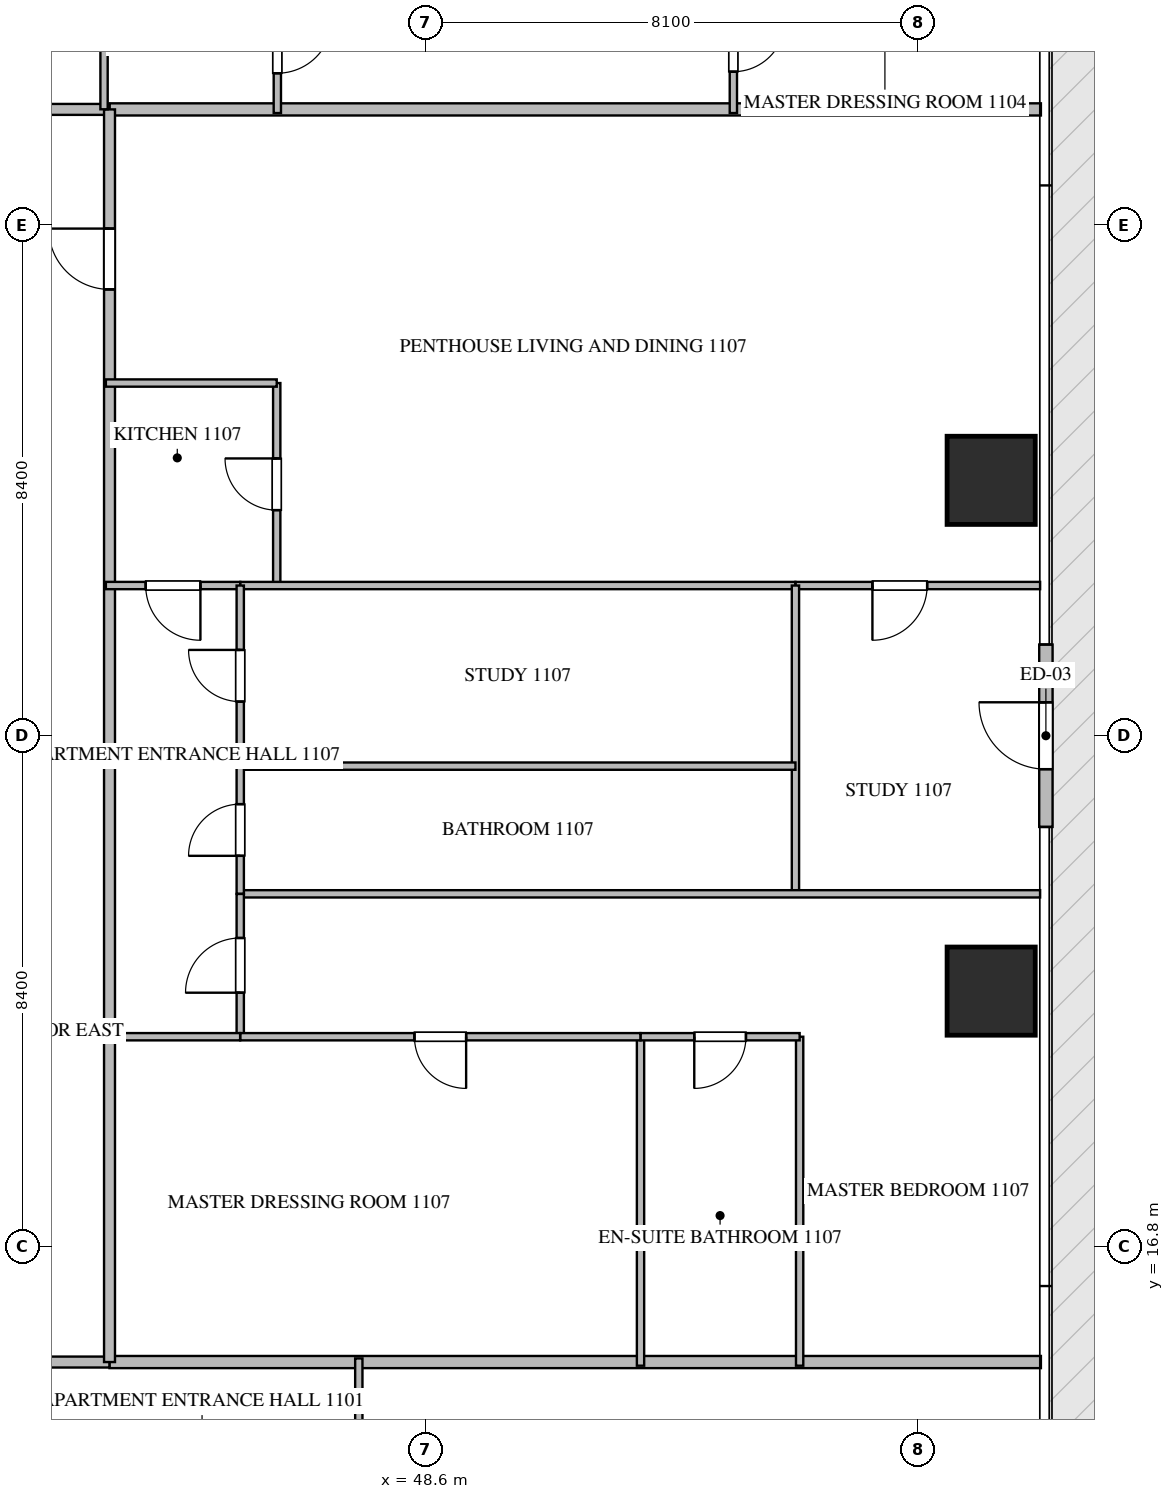
"""IFC4 building model, lengths in metres.
Left out: names, types, materials, properties, quantities, classifications, styles, units other than length and angle.
Written with IfcOpenShell. Run it as: python <this file> out.ifc"""

import sys

from ifc_helpers import new_model, si_unit, direction, frame, frame_2d, origin, origin_2d, place, context, subcontext, project, spatial, rectangle, extrude, source, transform, mapped, element, fill, save


model = new_model("IFC4")
c1 = context("Model", 3, precision=1e-05, world=origin(), true_north=direction((0.0, 1.0)))
c2 = subcontext(c1, "Body", "Model", "MODEL_VIEW")
j1 = project(units=[si_unit("LENGTHUNIT", "METRE"), si_unit("PLANEANGLEUNIT", "RADIAN")], contexts=[c1])
p1 = place(None, origin())
s1 = spatial("IfcSite", under=j1, at=p1, CompositionType="ELEMENT")
p2 = place(p1, origin())
s2 = spatial("IfcBuilding", under=s1, at=p2, CompositionType="ELEMENT")
p3 = place(p2, frame((0.0, 0.0, 49.2)))
s3 = spatial("IfcBuildingStorey", under=s2, at=p3, CompositionType="ELEMENT", Elevation=49.2)
m1 = source(origin(), c2, "Body", "SweptSolid", [
    extrude(rectangle(XDim=1.45, YDim=1.45, at=origin_2d()), origin(), (0.0, 0.0, 1.0), 3.75),
])
for number, where, z_axis, x_axis in (
    (1, (57.9, 21.0, -0.26), (0.0, 0.0, 1.0), (1.0, 0.0, 0.0)),
    (2, (57.9, 29.4, -0.26), (0.0, 0.0, 1.0), (1.0, 0.0, 0.0)),
):
    element("IfcColumn", number, at=place(p3, frame(where, z_axis=z_axis, x_axis=x_axis)), inside=s3, PredefinedType="COLUMN", context=c2, shape_type="MappedRepresentation", body=[
        mapped(m1, transform((0.0, 0.0, 0.0), scale=1.0)),
    ])
p4 = place(p3, frame((58.8, 23.7, 0.0), z_axis=(0.0, 0.0, 1.0), x_axis=(0.0, 1.0, 0.0)))
e3 = element("IfcWall", 3, at=p4, inside=s3, PredefinedType="ELEMENTEDWALL", context=c2, shape_type="SweptSolid", body=[
    extrude(rectangle(XDim=3.0, YDim=0.22, at=frame_2d((1.5, 0.0))), origin(), (0.0, 0.0, 1.0), 3.475),
])
p5 = place(p4, frame((0.95, 0.0, 0.0)))
e4 = element("IfcOpeningElement", 4, at=p5, cuts=e3, PredefinedType="OPENING", context=c2, shape_type="SweptSolid", body=[
    extrude(rectangle(XDim=1.1, YDim=2.2, at=frame_2d((0.55, 1.1))), frame((0.0, 0.12, 0.0), z_axis=(0.0, -1.0, 0.0), x_axis=(1.0, 0.0, 0.0)), (0.0, 0.0, 1.0), 0.24),
])
for number, where, z_axis, x_axis in (
    (5, (43.4, 14.9, 0.0), (0.0, 0.0, 1.0), (1.0, 0.0, 0.0)),
    (6, (43.4, 35.5, 0.0), (0.0, 0.0, 1.0), (1.0, 0.0, 0.0)),
):
    element("IfcWall", number, at=place(p3, frame(where, z_axis=z_axis, x_axis=x_axis)), inside=s3, PredefinedType="PARTITIONING", context=c2, shape_type="SweptSolid", body=[
        extrude(rectangle(XDim=15.318, YDim=0.2, at=frame_2d((7.659, 0.0))), origin(), (0.0, 0.0, 1.0), 3.49),
    ])
p6 = place(p3, frame((21.402, 14.9, 0.0), z_axis=(0.0, 0.0, 1.0), x_axis=(1.0, 0.0, 0.0)))
e7 = element("IfcWall", 7, at=p6, inside=s3, PredefinedType="PARTITIONING", context=c2, shape_type="SweptSolid", body=[
    extrude(rectangle(XDim=21.996, YDim=0.18, at=frame_2d((10.998, 0.0))), origin(), (0.0, 0.0, 1.0), 3.49),
])
p7 = place(p6, frame((15.222, 0.0, 0.0)))
e8 = element("IfcOpeningElement", 8, at=p7, cuts=e7, PredefinedType="OPENING", context=c2, shape_type="SweptSolid", body=[
    extrude(rectangle(XDim=1.0, YDim=2.15, at=frame_2d((0.5, 1.075))), frame((0.0, 0.1, 0.0), z_axis=(0.0, -1.0, 0.0), x_axis=(1.0, 0.0, 0.0)), (0.0, 0.0, 1.0), 0.2),
])
p8 = place(p3, frame((21.402, 35.5, 0.0), z_axis=(0.0, 0.0, 1.0), x_axis=(1.0, 0.0, 0.0)))
e9 = element("IfcWall", 9, at=p8, inside=s3, PredefinedType="PARTITIONING", context=c2, shape_type="SweptSolid", body=[
    extrude(rectangle(XDim=21.996, YDim=0.18, at=frame_2d((10.998, 0.0))), origin(), (0.0, 0.0, 1.0), 3.49),
])
p9 = place(p8, frame((2.1, 0.0, 0.0)))
e10 = element("IfcOpeningElement", 10, at=p9, cuts=e9, PredefinedType="OPENING", context=c2, shape_type="SweptSolid", body=[
    extrude(rectangle(XDim=1.0, YDim=2.15, at=frame_2d((0.5, 1.075))), frame((0.0, 0.1, 0.0), z_axis=(0.0, -1.0, 0.0), x_axis=(1.0, 0.0, 0.0)), (0.0, 0.0, 1.0), 0.2),
])
p10 = place(p8, frame((14.214, 0.0, 0.0)))
e11 = element("IfcOpeningElement", 11, at=p10, cuts=e9, PredefinedType="OPENING", context=c2, shape_type="SweptSolid", body=[
    extrude(rectangle(XDim=1.0, YDim=2.15, at=frame_2d((0.5, 1.075))), frame((0.0, 0.1, 0.0), z_axis=(0.0, -1.0, 0.0), x_axis=(1.0, 0.0, 0.0)), (0.0, 0.0, 1.0), 0.2),
])
p11 = place(p8, frame((18.896, 0.0, 0.0)))
e12 = element("IfcOpeningElement", 12, at=p11, cuts=e9, PredefinedType="OPENING", context=c2, shape_type="SweptSolid", body=[
    extrude(rectangle(XDim=1.0, YDim=2.15, at=frame_2d((0.5, 1.075))), frame((0.0, 0.1, 0.0), z_axis=(0.0, -1.0, 0.0), x_axis=(1.0, 0.0, 0.0)), (0.0, 0.0, 1.0), 0.2),
])
p12 = place(p3, frame((43.4, 14.9, 0.0), z_axis=(0.0, 0.0, 1.0), x_axis=(0.0, 1.0, 0.0)))
e13 = element("IfcWall", 13, at=p12, inside=s3, PredefinedType="PARTITIONING", context=c2, shape_type="SweptSolid", body=[
    extrude(rectangle(XDim=20.6, YDim=0.18, at=frame_2d((10.3, 0.0))), origin(), (0.0, 0.0, 1.0), 3.49),
])
p13 = place(p12, frame((17.64, 0.0, 0.0)))
e14 = element("IfcOpeningElement", 14, at=p13, cuts=e13, PredefinedType="OPENING", context=c2, shape_type="SweptSolid", body=[
    extrude(rectangle(XDim=1.0, YDim=2.15, at=frame_2d((0.5, 1.075))), frame((0.0, 0.1, 0.0), z_axis=(0.0, -1.0, 0.0), x_axis=(1.0, 0.0, 0.0)), (0.0, 0.0, 1.0), 0.2),
])
p14 = place(p3, frame((47.5, 12.752, 0.0), z_axis=(0.0, 0.0, 1.0), x_axis=(0.0, 1.0, 0.0)))
e15 = element("IfcWall", 15, at=p14, inside=s3, PredefinedType="PARTITIONING", context=c2, shape_type="SweptSolid", body=[
    extrude(rectangle(XDim=2.208, YDim=0.12, at=frame_2d((1.104, 0.0))), origin(), (0.0, 0.0, 1.0), 3.49),
])
p15 = place(p3, frame((43.31, 38.25, 0.0), z_axis=(0.0, 0.0, 1.0), x_axis=(0.0, -1.0, 0.0)))
e16 = element("IfcWall", 16, at=p15, inside=s3, PredefinedType="PARTITIONING", context=c2, shape_type="SweptSolid", body=[
    extrude(rectangle(XDim=2.748, YDim=0.12, at=frame_2d((1.374, 0.0))), origin(), (0.0, 0.0, 1.0), 3.49),
])
p16 = place(p3, frame((46.16, 37.65, 0.0), z_axis=(0.0, 0.0, 1.0), x_axis=(0.0, -1.0, 0.0)))
e17 = element("IfcWall", 17, at=p16, inside=s3, PredefinedType="PARTITIONING", context=c2, shape_type="SweptSolid", body=[
    extrude(rectangle(XDim=2.21, YDim=0.12, at=frame_2d((1.105, 0.0))), origin(), (0.0, 0.0, 1.0), 3.49),
])
p17 = place(p16, frame((0.655, 0.0, 0.0)))
e18 = element("IfcOpeningElement", 18, at=p17, cuts=e17, PredefinedType="OPENING", context=c2, shape_type="SweptSolid", body=[
    extrude(rectangle(XDim=0.9, YDim=2.1, at=frame_2d((0.45, 1.05))), frame((0.0, 0.07, 0.0), z_axis=(0.0, -1.0, 0.0), x_axis=(1.0, 0.0, 0.0)), (0.0, 0.0, 1.0), 0.14),
])
p18 = place(p3, frame((53.66, 37.65, 0.0), z_axis=(0.0, 0.0, 1.0), x_axis=(0.0, -1.0, 0.0)))
e19 = element("IfcWall", 19, at=p18, inside=s3, PredefinedType="PARTITIONING", context=c2, shape_type="SweptSolid", body=[
    extrude(rectangle(XDim=2.21, YDim=0.12, at=frame_2d((1.105, 0.0))), origin(), (0.0, 0.0, 1.0), 3.49),
])
p19 = place(p18, frame((0.68, 0.0, 0.0)))
e20 = element("IfcOpeningElement", 20, at=p19, cuts=e19, PredefinedType="OPENING", context=c2, shape_type="SweptSolid", body=[
    extrude(rectangle(XDim=0.85, YDim=2.1, at=frame_2d((0.425, 1.05))), frame((0.0, 0.07, 0.0), z_axis=(0.0, -1.0, 0.0), x_axis=(1.0, 0.0, 0.0)), (0.0, 0.0, 1.0), 0.14),
])
p20 = place(p3, frame((46.15, 27.67, 0.0), z_axis=(0.0, 0.0, 1.0), x_axis=(0.0, 1.0, 0.0)))
e21 = element("IfcWall", 21, at=p20, inside=s3, PredefinedType="PARTITIONING", context=c2, shape_type="SweptSolid", body=[
    extrude(rectangle(XDim=3.33, YDim=0.12, at=frame_2d((1.665, 0.0))), origin(), (0.0, 0.0, 1.0), 3.49),
])
p21 = place(p20, frame((1.24, 0.0, 0.0)))
e22 = element("IfcOpeningElement", 22, at=p21, cuts=e21, PredefinedType="OPENING", context=c2, shape_type="SweptSolid", body=[
    extrude(rectangle(XDim=0.85, YDim=2.1, at=frame_2d((0.425, 1.05))), frame((0.0, 0.07, 0.0), z_axis=(0.0, -1.0, 0.0), x_axis=(1.0, 0.0, 0.0)), (0.0, 0.0, 1.0), 0.14),
])
p22 = place(p3, frame((46.15, 31.0, 0.0), z_axis=(0.0, 0.0, 1.0), x_axis=(-1.0, 0.0, 0.0)))
e23 = element("IfcWall", 23, at=p22, inside=s3, PredefinedType="PARTITIONING", context=c2, shape_type="SweptSolid", body=[
    extrude(rectangle(XDim=2.81, YDim=0.12, at=frame_2d((1.405, 0.0))), origin(), (0.0, 0.0, 1.0), 3.49),
])
p23 = place(p3, frame((45.55, 27.67, 0.0), z_axis=(0.0, 0.0, 1.0), x_axis=(-1.0, 0.0, 0.0)))
e24 = element("IfcWall", 24, at=p23, inside=s3, PredefinedType="PARTITIONING", context=c2, shape_type="SweptSolid", body=[
    extrude(rectangle(XDim=2.21, YDim=0.12, at=frame_2d((1.105, 0.0))), origin(), (0.0, 0.0, 1.0), 3.49),
])
p24 = place(p23, frame((0.655, 0.0, 0.0)))
e25 = element("IfcOpeningElement", 25, at=p24, cuts=e24, PredefinedType="OPENING", context=c2, shape_type="SweptSolid", body=[
    extrude(rectangle(XDim=0.9, YDim=2.1, at=frame_2d((0.45, 1.05))), frame((0.0, 0.07, 0.0), z_axis=(0.0, -1.0, 0.0), x_axis=(1.0, 0.0, 0.0)), (0.0, 0.0, 1.0), 0.14),
])
p25 = place(p3, frame((58.705, 27.67, 0.0), z_axis=(0.0, 0.0, 1.0), x_axis=(-1.0, 0.0, 0.0)))
e26 = element("IfcWall", 26, at=p25, inside=s3, PredefinedType="PARTITIONING", context=c2, shape_type="SweptSolid", body=[
    extrude(rectangle(XDim=4.024, YDim=0.12, at=frame_2d((2.012, 0.0))), origin(), (0.0, 0.0, 1.0), 3.49),
])
p26 = place(p25, frame((1.858, 0.0, 0.0)))
e27 = element("IfcOpeningElement", 27, at=p26, cuts=e26, PredefinedType="OPENING", context=c2, shape_type="SweptSolid", body=[
    extrude(rectangle(XDim=0.9, YDim=2.1, at=frame_2d((0.45, 1.05))), frame((0.0, 0.07, 0.0), z_axis=(0.0, -1.0, 0.0), x_axis=(1.0, 0.0, 0.0)), (0.0, 0.0, 1.0), 0.14),
])
p27 = place(p3, frame((54.679, 27.67, 0.0), z_axis=(0.0, 0.0, 1.0), x_axis=(-1.0, 0.0, 0.0)))
e28 = element("IfcWall", 28, at=p27, inside=s3, PredefinedType="PARTITIONING", context=c2, shape_type="SweptSolid", body=[
    extrude(rectangle(XDim=9.127, YDim=0.12, at=frame_2d((4.563, 0.0))), origin(), (0.0, 0.0, 1.0), 3.49),
])
p28 = place(p3, frame((54.681, 22.6, 0.0), z_axis=(0.0, 0.0, 1.0), x_axis=(0.0, 1.0, 0.0)))
e29 = element("IfcWall", 29, at=p28, inside=s3, PredefinedType="PARTITIONING", context=c2, shape_type="SweptSolid", body=[
    extrude(rectangle(XDim=5.07, YDim=0.12, at=frame_2d((2.535, 0.0))), origin(), (0.0, 0.0, 1.0), 3.49),
])
p29 = place(p3, frame((58.705, 22.6, 0.0), z_axis=(0.0, 0.0, 1.0), x_axis=(-1.0, 0.0, 0.0)))
e30 = element("IfcWall", 30, at=p29, inside=s3, PredefinedType="PARTITIONING", context=c2, shape_type="SweptSolid", body=[
    extrude(rectangle(XDim=13.155, YDim=0.12, at=frame_2d((6.578, 0.0))), origin(), (0.0, 0.0, 1.0), 3.49),
])
p30 = place(p3, frame((54.681, 24.7, 0.0), z_axis=(0.0, 0.0, 1.0), x_axis=(-1.0, 0.0, 0.0)))
e31 = element("IfcWall", 31, at=p30, inside=s3, PredefinedType="PARTITIONING", context=c2, shape_type="SweptSolid", body=[
    extrude(rectangle(XDim=9.131, YDim=0.12, at=frame_2d((4.565, 0.0))), origin(), (0.0, 0.0, 1.0), 3.49),
])
p31 = place(p3, frame((45.55, 22.6, 0.0), z_axis=(0.0, 0.0, 1.0), x_axis=(0.0, 1.0, 0.0)))
e32 = element("IfcWall", 32, at=p31, inside=s3, PredefinedType="PARTITIONING", context=c2, shape_type="SweptSolid", body=[
    extrude(rectangle(XDim=2.1, YDim=0.12, at=frame_2d((1.05, 0.0))), origin(), (0.0, 0.0, 1.0), 3.49),
])
p32 = place(p31, frame((0.625, 0.0, 0.0)))
e33 = element("IfcOpeningElement", 33, at=p32, cuts=e32, PredefinedType="OPENING", context=c2, shape_type="SweptSolid", body=[
    extrude(rectangle(XDim=0.85, YDim=2.1, at=frame_2d((0.425, 1.05))), frame((0.0, 0.07, 0.0), z_axis=(0.0, -1.0, 0.0), x_axis=(1.0, 0.0, 0.0)), (0.0, 0.0, 1.0), 0.14),
])
p33 = place(p3, frame((45.55, 24.702, 0.0), z_axis=(0.0, 0.0, 1.0), x_axis=(0.0, 1.0, 0.0)))
e34 = element("IfcWall", 34, at=p33, inside=s3, PredefinedType="PARTITIONING", context=c2, shape_type="SweptSolid", body=[
    extrude(rectangle(XDim=2.968, YDim=0.12, at=frame_2d((1.484, 0.0))), origin(), (0.0, 0.0, 1.0), 3.49),
])
p34 = place(p33, frame((1.059, 0.0, 0.0)))
e35 = element("IfcOpeningElement", 35, at=p34, cuts=e34, PredefinedType="OPENING", context=c2, shape_type="SweptSolid", body=[
    extrude(rectangle(XDim=0.85, YDim=2.1, at=frame_2d((0.425, 1.05))), frame((0.0, 0.07, 0.0), z_axis=(0.0, -1.0, 0.0), x_axis=(1.0, 0.0, 0.0)), (0.0, 0.0, 1.0), 0.14),
])
p35 = place(p3, frame((45.55, 20.25, 0.0), z_axis=(0.0, 0.0, 1.0), x_axis=(0.0, 1.0, 0.0)))
e36 = element("IfcWall", 36, at=p35, inside=s3, PredefinedType="PARTITIONING", context=c2, shape_type="SweptSolid", body=[
    extrude(rectangle(XDim=2.348, YDim=0.12, at=frame_2d((1.174, 0.0))), origin(), (0.0, 0.0, 1.0), 3.49),
])
p36 = place(p35, frame((0.724, 0.0, 0.0)))
e37 = element("IfcOpeningElement", 37, at=p36, cuts=e36, PredefinedType="OPENING", context=c2, shape_type="SweptSolid", body=[
    extrude(rectangle(XDim=0.9, YDim=2.1, at=frame_2d((0.45, 1.05))), frame((0.0, 0.07, 0.0), z_axis=(0.0, -1.0, 0.0), x_axis=(1.0, 0.0, 0.0)), (0.0, 0.0, 1.0), 0.14),
])
for number, where, z_axis, x_axis in (
    (38, (54.75, 14.84, 0.0), (0.0, 0.0, 1.0), (0.0, 1.0, 0.0)),
    (39, (52.133, 14.84, 0.0), (0.0, 0.0, 1.0), (0.0, 1.0, 0.0)),
):
    element("IfcWall", number, at=place(p3, frame(where, z_axis=z_axis, x_axis=x_axis)), inside=s3, PredefinedType="PARTITIONING", context=c2, shape_type="SweptSolid", body=[
        extrude(rectangle(XDim=5.41, YDim=0.12, at=frame_2d((2.705, 0.0))), origin(), (0.0, 0.0, 1.0), 3.49),
    ])
p37 = place(p3, frame((54.75, 20.25, 0.0), z_axis=(0.0, 0.0, 1.0), x_axis=(-1.0, 0.0, 0.0)))
e40 = element("IfcWall", 40, at=p37, inside=s3, PredefinedType="PARTITIONING", context=c2, shape_type="SweptSolid", body=[
    extrude(rectangle(XDim=2.617, YDim=0.12, at=frame_2d((1.309, 0.0))), origin(), (0.0, 0.0, 1.0), 3.49),
])
p38 = place(p37, frame((0.883, 0.0, 0.0)))
e41 = element("IfcOpeningElement", 41, at=p38, cuts=e40, PredefinedType="OPENING", context=c2, shape_type="SweptSolid", body=[
    extrude(rectangle(XDim=0.85, YDim=2.1, at=frame_2d((0.425, 1.05))), frame((0.0, 0.07, 0.0), z_axis=(0.0, -1.0, 0.0), x_axis=(1.0, 0.0, 0.0)), (0.0, 0.0, 1.0), 0.14),
])
p39 = place(p3, frame((52.131, 20.25, 0.0), z_axis=(0.0, 0.0, 1.0), x_axis=(-1.0, 0.0, 0.0)))
e42 = element("IfcWall", 42, at=p39, inside=s3, PredefinedType="PARTITIONING", context=c2, shape_type="SweptSolid", body=[
    extrude(rectangle(XDim=6.581, YDim=0.12, at=frame_2d((3.291, 0.0))), origin(), (0.0, 0.0, 1.0), 3.49),
])
p40 = place(p39, frame((2.866, 0.0, 0.0)))
e43 = element("IfcOpeningElement", 43, at=p40, cuts=e42, PredefinedType="OPENING", context=c2, shape_type="SweptSolid", body=[
    extrude(rectangle(XDim=0.85, YDim=2.1, at=frame_2d((0.425, 1.05))), frame((0.0, 0.07, 0.0), z_axis=(0.0, -1.0, 0.0), x_axis=(1.0, 0.0, 0.0)), (0.0, 0.0, 1.0), 0.14),
])
p41 = place(p3, frame((45.548, 20.25, 0.0), z_axis=(0.0, 0.0, 1.0), x_axis=(-1.0, 0.0, 0.0)))
e44 = element("IfcWall", 44, at=p41, inside=s3, PredefinedType="PARTITIONING", context=c2, shape_type="SweptSolid", body=[
    extrude(rectangle(XDim=2.208, YDim=0.12, at=frame_2d((1.104, 0.0))), origin(), (0.0, 0.0, 1.0), 3.49),
])
m2 = source(origin(), c2, "Body", "SweptSolid", [
    extrude(rectangle(XDim=1.1, YDim=2.2, at=frame_2d((0.55, 1.1))), frame((0.0, 0.025, 0.0), z_axis=(0.0, -1.0, 0.0), x_axis=(1.0, 0.0, 0.0)), (0.0, 0.0, 1.0), 0.05),
])
p42 = place(p5, origin())
e45 = element("IfcDoor", 45, at=p42, inside=s3, OperationType="SINGLE_SWING_RIGHT", PredefinedType="DOOR", context=c2, shape_type="MappedRepresentation", body=[
    mapped(m2, transform((0.0, 0.0, 0.0), scale=1.0)),
])
fill(e4, e45)
m3 = source(origin(), c2, "Body", "SweptSolid", [
    extrude(rectangle(XDim=1.0, YDim=2.15, at=frame_2d((0.5, 1.075))), frame((0.0, 0.025, 0.0), z_axis=(0.0, -1.0, 0.0), x_axis=(1.0, 0.0, 0.0)), (0.0, 0.0, 1.0), 0.05),
])
p43 = place(p13, origin())
e46 = element("IfcDoor", 46, at=p43, inside=s3, OperationType="SINGLE_SWING_RIGHT", PredefinedType="DOOR", context=c2, shape_type="MappedRepresentation", body=[
    mapped(m3, transform((0.0, 0.0, 0.0), scale=1.0)),
])
fill(e14, e46)
m4 = source(origin(), c2, "Body", "SweptSolid", [
    extrude(rectangle(XDim=0.9, YDim=2.1, at=frame_2d((0.45, 1.05))), frame((0.0, 0.025, 0.0), z_axis=(0.0, -1.0, 0.0), x_axis=(1.0, 0.0, 0.0)), (0.0, 0.0, 1.0), 0.05),
])
p44 = place(p17, origin())
e47 = element("IfcDoor", 47, at=p44, inside=s3, OperationType="SINGLE_SWING_LEFT", PredefinedType="DOOR", context=c2, shape_type="MappedRepresentation", body=[
    mapped(m4, transform((0.0, 0.0, 0.0), scale=1.0)),
])
fill(e18, e47)
m5 = source(origin(), c2, "Body", "SweptSolid", [
    extrude(rectangle(XDim=0.85, YDim=2.1, at=frame_2d((0.425, 1.05))), frame((0.0, 0.025, 0.0), z_axis=(0.0, -1.0, 0.0), x_axis=(1.0, 0.0, 0.0)), (0.0, 0.0, 1.0), 0.05),
])
p45 = place(p19, origin())
e48 = element("IfcDoor", 48, at=p45, inside=s3, OperationType="SINGLE_SWING_LEFT", PredefinedType="DOOR", context=c2, shape_type="MappedRepresentation", body=[
    mapped(m5, transform((0.0, 0.0, 0.0), scale=1.0)),
])
fill(e20, e48)
p46 = place(p21, origin())
e49 = element("IfcDoor", 49, at=p46, inside=s3, OperationType="SINGLE_SWING_RIGHT", PredefinedType="DOOR", context=c2, shape_type="MappedRepresentation", body=[
    mapped(m5, transform((0.0, 0.0, 0.0), scale=1.0)),
])
fill(e22, e49)
p47 = place(p24, origin())
e50 = element("IfcDoor", 50, at=p47, inside=s3, OperationType="SINGLE_SWING_LEFT", PredefinedType="DOOR", context=c2, shape_type="MappedRepresentation", body=[
    mapped(m4, transform((0.0, 0.0, 0.0), scale=1.0)),
])
fill(e25, e50)
p48 = place(p26, origin())
e51 = element("IfcDoor", 51, at=p48, inside=s3, OperationType="SINGLE_SWING_RIGHT", PredefinedType="DOOR", context=c2, shape_type="MappedRepresentation", body=[
    mapped(m4, transform((0.0, 0.0, 0.0), scale=1.0)),
])
fill(e27, e51)
p49 = place(p32, origin())
e52 = element("IfcDoor", 52, at=p49, inside=s3, OperationType="SINGLE_SWING_LEFT", PredefinedType="DOOR", context=c2, shape_type="MappedRepresentation", body=[
    mapped(m5, transform((0.0, 0.0, 0.0), scale=1.0)),
])
fill(e33, e52)
p50 = place(p34, origin())
e53 = element("IfcDoor", 53, at=p50, inside=s3, OperationType="SINGLE_SWING_RIGHT", PredefinedType="DOOR", context=c2, shape_type="MappedRepresentation", body=[
    mapped(m5, transform((0.0, 0.0, 0.0), scale=1.0)),
])
fill(e35, e53)
p51 = place(p36, origin())
e54 = element("IfcDoor", 54, at=p51, inside=s3, OperationType="SINGLE_SWING_LEFT", PredefinedType="DOOR", context=c2, shape_type="MappedRepresentation", body=[
    mapped(m4, transform((0.0, 0.0, 0.0), scale=1.0)),
])
fill(e37, e54)
p52 = place(p38, origin())
e55 = element("IfcDoor", 55, at=p52, inside=s3, OperationType="SINGLE_SWING_RIGHT", PredefinedType="DOOR", context=c2, shape_type="MappedRepresentation", body=[
    mapped(m5, transform((0.0, 0.0, 0.0), scale=1.0)),
])
fill(e41, e55)
p53 = place(p40, origin())
e56 = element("IfcDoor", 56, at=p53, inside=s3, OperationType="SINGLE_SWING_LEFT", PredefinedType="DOOR", context=c2, shape_type="MappedRepresentation", body=[
    mapped(m5, transform((0.0, 0.0, 0.0), scale=1.0)),
])
fill(e43, e56)
save(model, sys.argv[1])
